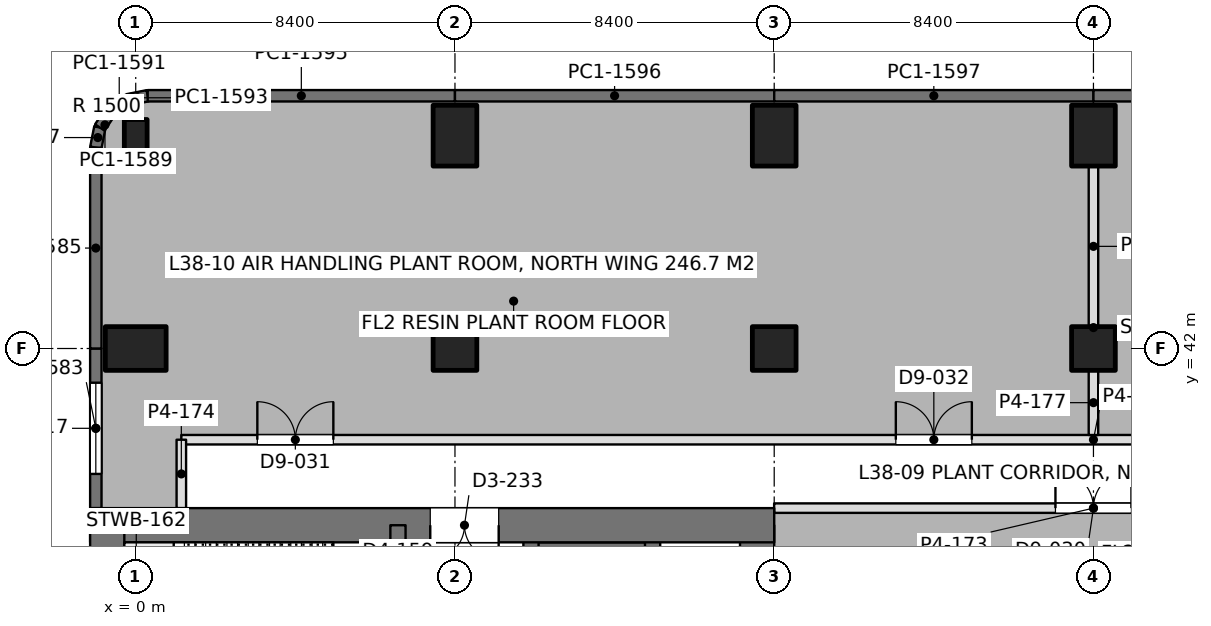
"""IFC4 building model, lengths in metres.
Left out: names, types, materials, properties, quantities, classifications, styles, units other than length and angle.
Written with IfcOpenShell. Run it as: python <this file> out.ifc"""

import sys

from ifc_helpers import new_model, si_unit, direction, frame, frame_2d, origin, origin_2d, place, context, subcontext, project, spatial, rectangle, extrude, element, fill, save


model = new_model("IFC4")
c1 = context("Model", 3, precision=1e-05, world=origin(), true_north=direction((0.0, 1.0)))
c2 = subcontext(c1, "Body", "Model", "MODEL_VIEW")
j1 = project(units=[si_unit("LENGTHUNIT", "METRE"), si_unit("PLANEANGLEUNIT", "RADIAN")], contexts=[c1])
p1 = place(None, origin())
s1 = spatial("IfcSite", under=j1, at=p1, CompositionType="ELEMENT")
p2 = place(p1, origin())
s2 = spatial("IfcBuilding", under=s1, at=p2, CompositionType="ELEMENT")
p3 = place(p2, frame((0.0, 0.0, 168.0)))
s3 = spatial("IfcBuildingStorey", under=s2, at=p3, CompositionType="ELEMENT", Elevation=168.0)
p4 = place(p3, frame((0.0, 42.0, 0.0), z_axis=(0.0, 0.0, 1.0), x_axis=(0.0, 1.0, 0.0)))
e1 = element("IfcColumn", 1, at=p4, inside=s3, PredefinedType="COLUMN", context=c2, shape_type="SweptSolid", body=[
    extrude(rectangle(XDim=1.15, YDim=1.6, at=origin_2d()), origin(), (0.0, 0.0, 1.0), 5.4),
])
p5 = place(p3, frame((0.0, 47.6, 0.0), z_axis=(0.0, 0.0, 1.0), x_axis=(1.0, 0.0, 0.0)))
e2 = element("IfcColumn", 2, at=p5, inside=s3, PredefinedType="COLUMN", context=c2, shape_type="SweptSolid", body=[
    extrude(rectangle(XDim=0.6, YDim=0.85, at=origin_2d()), origin(), (0.0, 0.0, 1.0), 5.24),
])
p6 = place(p3, frame((8.4, 42.0, 0.0), z_axis=(0.0, 0.0, 1.0), x_axis=(1.0, 0.0, 0.0)))
e3 = element("IfcColumn", 3, at=p6, inside=s3, PredefinedType="COLUMN", context=c2, shape_type="SweptSolid", body=[
    extrude(rectangle(XDim=1.15, YDim=1.15, at=origin_2d()), origin(), (0.0, 0.0, 1.0), 5.4),
])
p7 = place(p3, frame((8.4, 47.6, 0.0), z_axis=(0.0, 0.0, 1.0), x_axis=(1.0, 0.0, 0.0)))
e4 = element("IfcColumn", 4, at=p7, inside=s3, PredefinedType="COLUMN", context=c2, shape_type="SweptSolid", body=[
    extrude(rectangle(XDim=1.15, YDim=1.6, at=origin_2d()), origin(), (0.0, 0.0, 1.0), 5.24),
])
p8 = place(p3, frame((16.8, 42.0, 0.0), z_axis=(0.0, 0.0, 1.0), x_axis=(1.0, 0.0, 0.0)))
e5 = element("IfcColumn", 5, at=p8, inside=s3, PredefinedType="COLUMN", context=c2, shape_type="SweptSolid", body=[
    extrude(rectangle(XDim=1.15, YDim=1.15, at=origin_2d()), origin(), (0.0, 0.0, 1.0), 5.4),
])
p9 = place(p3, frame((16.8, 47.6, 0.0), z_axis=(0.0, 0.0, 1.0), x_axis=(1.0, 0.0, 0.0)))
e6 = element("IfcColumn", 6, at=p9, inside=s3, PredefinedType="COLUMN", context=c2, shape_type="SweptSolid", body=[
    extrude(rectangle(XDim=1.15, YDim=1.6, at=origin_2d()), origin(), (0.0, 0.0, 1.0), 5.24),
])
p10 = place(p3, frame((25.2, 42.0, 0.0), z_axis=(0.0, 0.0, 1.0), x_axis=(1.0, 0.0, 0.0)))
e7 = element("IfcColumn", 7, at=p10, inside=s3, PredefinedType="COLUMN", context=c2, shape_type="SweptSolid", body=[
    extrude(rectangle(XDim=1.15, YDim=1.15, at=origin_2d()), origin(), (0.0, 0.0, 1.0), 5.4),
])
p11 = place(p3, frame((25.2, 47.6, 0.0), z_axis=(0.0, 0.0, 1.0), x_axis=(1.0, 0.0, 0.0)))
e8 = element("IfcColumn", 8, at=p11, inside=s3, PredefinedType="COLUMN", context=c2, shape_type="SweptSolid", body=[
    extrude(rectangle(XDim=1.15, YDim=1.6, at=origin_2d()), origin(), (0.0, 0.0, 1.0), 5.24),
])
p12 = place(p3, frame((-1.2, 37.35, 0.0), z_axis=(0.0, 0.0, 1.0), x_axis=(1.0, 0.0, 0.0)))
e9 = element("IfcWall", 9, at=p12, inside=s3, PredefinedType="SHEAR", context=c2, shape_type="SweptSolid", body=[
    extrude(rectangle(XDim=18.0, YDim=0.9, at=frame_2d((9.0, 0.0))), origin(), (0.0, 0.0, 1.0), 5.4),
])
p13 = place(p12, frame((8.95, 0.0, 0.0)))
e10 = element("IfcOpeningElement", 10, at=p13, cuts=e9, PredefinedType="OPENING", context=c2, shape_type="SweptSolid", body=[
    extrude(rectangle(XDim=1.8, YDim=2.4, at=frame_2d((0.9, 1.2))), frame((0.0, 0.46, 0.0), z_axis=(0.0, -1.0, 0.0), x_axis=(1.0, 0.0, 0.0)), (0.0, 0.0, 1.0), 0.92),
])
p14 = place(p3, frame((-0.75, 13.05, 0.0), z_axis=(0.0, 0.0, 1.0), x_axis=(0.0, 1.0, 0.0)))
e11 = element("IfcWall", 11, at=p14, inside=s3, PredefinedType="SHEAR", context=c2, shape_type="SweptSolid", body=[
    extrude(rectangle(XDim=24.3, YDim=0.9, at=frame_2d((12.15, 0.0))), origin(), (0.0, 0.0, 1.0), 5.4),
])
p15 = place(p3, frame((16.35, 22.1, 0.0), z_axis=(0.0, 0.0, 1.0), x_axis=(0.0, 1.0, 0.0)))
e12 = element("IfcWall", 12, at=p15, inside=s3, PredefinedType="SHEAR", context=c2, shape_type="SweptSolid", body=[
    extrude(rectangle(XDim=15.25, YDim=0.9, at=frame_2d((7.625, 0.0))), origin(), (0.0, 0.0, 1.0), 5.4),
])
p16 = place(p3, frame((6.9, 13.05, 0.0), z_axis=(0.0, 0.0, 1.0), x_axis=(0.0, 1.0, 0.0)))
e13 = element("IfcWall", 13, at=p16, inside=s3, PredefinedType="SHEAR", context=c2, shape_type="SweptSolid", body=[
    extrude(rectangle(XDim=24.3, YDim=0.4, at=frame_2d((12.15, 0.0))), origin(), (0.0, 0.0, 1.0), 5.4),
])
p17 = place(p16, frame((1.3, 0.0, 0.0)))
e14 = element("IfcOpeningElement", 14, at=p17, cuts=e13, PredefinedType="OPENING", context=c2, shape_type="SweptSolid", body=[
    extrude(rectangle(XDim=1.0, YDim=2.2, at=frame_2d((0.5, 1.1))), frame((0.0, 0.21, 0.0), z_axis=(0.0, -1.0, 0.0), x_axis=(1.0, 0.0, 0.0)), (0.0, 0.0, 1.0), 0.42),
])
p18 = place(p16, frame((22.0, 0.0, 0.0)))
e15 = element("IfcOpeningElement", 15, at=p18, cuts=e13, PredefinedType="OPENING", context=c2, shape_type="SweptSolid", body=[
    extrude(rectangle(XDim=1.0, YDim=2.2, at=frame_2d((0.5, 1.1))), frame((0.0, 0.21, 0.0), z_axis=(0.0, -1.0, 0.0), x_axis=(1.0, 0.0, 0.0)), (0.0, 0.0, 1.0), 0.42),
])
p19 = place(p16, frame((5.55, 0.0, 0.0)))
e16 = element("IfcOpeningElement", 16, at=p19, cuts=e13, PredefinedType="OPENING", context=c2, shape_type="SweptSolid", body=[
    extrude(rectangle(XDim=1.0, YDim=2.2, at=frame_2d((0.5, 1.1))), frame((0.0, 0.21, 0.0), z_axis=(0.0, -1.0, 0.0), x_axis=(1.0, 0.0, 0.0)), (0.0, 0.0, 1.0), 0.42),
])
p20 = place(p16, frame((9.55, 0.0, 0.0)))
e17 = element("IfcOpeningElement", 17, at=p20, cuts=e13, PredefinedType="OPENING", context=c2, shape_type="SweptSolid", body=[
    extrude(rectangle(XDim=1.0, YDim=2.2, at=frame_2d((0.5, 1.1))), frame((0.0, 0.21, 0.0), z_axis=(0.0, -1.0, 0.0), x_axis=(1.0, 0.0, 0.0)), (0.0, 0.0, 1.0), 0.42),
])
p21 = place(p16, frame((12.8, 0.0, 0.0)))
e18 = element("IfcOpeningElement", 18, at=p21, cuts=e13, PredefinedType="OPENING", context=c2, shape_type="SweptSolid", body=[
    extrude(rectangle(XDim=1.1, YDim=2.2, at=frame_2d((0.55, 1.1))), frame((0.0, 0.21, 0.0), z_axis=(0.0, -1.0, 0.0), x_axis=(1.0, 0.0, 0.0)), (0.0, 0.0, 1.0), 0.42),
])
p22 = place(p16, frame((15.538, 0.0, 0.0)))
e19 = element("IfcOpeningElement", 19, at=p22, cuts=e13, PredefinedType="OPENING", context=c2, shape_type="SweptSolid", body=[
    extrude(rectangle(XDim=1.1, YDim=2.2, at=frame_2d((0.55, 1.1))), frame((0.0, 0.21, 0.0), z_axis=(0.0, -1.0, 0.0), x_axis=(1.0, 0.0, 0.0)), (0.0, 0.0, 1.0), 0.42),
])
p23 = place(p16, frame((18.262, 0.0, 0.0)))
e20 = element("IfcOpeningElement", 20, at=p23, cuts=e13, PredefinedType="OPENING", context=c2, shape_type="SweptSolid", body=[
    extrude(rectangle(XDim=1.1, YDim=2.2, at=frame_2d((0.55, 1.1))), frame((0.0, 0.21, 0.0), z_axis=(0.0, -1.0, 0.0), x_axis=(1.0, 0.0, 0.0)), (0.0, 0.0, 1.0), 0.42),
])
p24 = place(p3, frame((10.4, 13.05, 0.0), z_axis=(0.0, 0.0, 1.0), x_axis=(0.0, 1.0, 0.0)))
e21 = element("IfcWall", 21, at=p24, inside=s3, PredefinedType="SHEAR", context=c2, shape_type="SweptSolid", body=[
    extrude(rectangle(XDim=24.3, YDim=0.4, at=frame_2d((12.15, 0.0))), origin(), (0.0, 0.0, 1.0), 5.4),
])
p25 = place(p24, frame((10.05, 0.0, 0.0)))
e22 = element("IfcOpeningElement", 22, at=p25, cuts=e21, PredefinedType="OPENING", context=c2, shape_type="SweptSolid", body=[
    extrude(rectangle(XDim=1.1, YDim=2.2, at=frame_2d((0.55, 1.1))), frame((0.0, 0.21, 0.0), z_axis=(0.0, -1.0, 0.0), x_axis=(1.0, 0.0, 0.0)), (0.0, 0.0, 1.0), 0.42),
])
p26 = place(p24, frame((12.9, 0.0, 0.0)))
e23 = element("IfcOpeningElement", 23, at=p26, cuts=e21, PredefinedType="OPENING", context=c2, shape_type="SweptSolid", body=[
    extrude(rectangle(XDim=1.1, YDim=2.2, at=frame_2d((0.55, 1.1))), frame((0.0, 0.21, 0.0), z_axis=(0.0, -1.0, 0.0), x_axis=(1.0, 0.0, 0.0)), (0.0, 0.0, 1.0), 0.42),
])
p27 = place(p24, frame((21.45, 0.0, 0.0)))
e24 = element("IfcOpeningElement", 24, at=p27, cuts=e21, PredefinedType="OPENING", context=c2, shape_type="SweptSolid", body=[
    extrude(rectangle(XDim=1.1, YDim=2.2, at=frame_2d((0.55, 1.1))), frame((0.0, 0.21, 0.0), z_axis=(0.0, -1.0, 0.0), x_axis=(1.0, 0.0, 0.0)), (0.0, 0.0, 1.0), 0.42),
])
p28 = place(p24, frame((5.8, 0.0, 0.0)))
e25 = element("IfcOpeningElement", 25, at=p28, cuts=e21, PredefinedType="OPENING", context=c2, shape_type="SweptSolid", body=[
    extrude(rectangle(XDim=1.8, YDim=2.4, at=frame_2d((0.9, 1.2))), frame((0.0, 0.21, 0.0), z_axis=(0.0, -1.0, 0.0), x_axis=(1.0, 0.0, 0.0)), (0.0, 0.0, 1.0), 0.42),
])
p29 = place(p24, frame((1.05, 0.0, 0.0)))
e26 = element("IfcOpeningElement", 26, at=p29, cuts=e21, PredefinedType="OPENING", context=c2, shape_type="SweptSolid", body=[
    extrude(rectangle(XDim=1.8, YDim=2.4, at=frame_2d((0.9, 1.2))), frame((0.0, 0.21, 0.0), z_axis=(0.0, -1.0, 0.0), x_axis=(1.0, 0.0, 0.0)), (0.0, 0.0, 1.0), 0.42),
])
p30 = place(p3, frame((13.6, 22.225, 0.0), z_axis=(0.0, 0.0, 1.0), x_axis=(0.0, 1.0, 0.0)))
e27 = element("IfcWall", 27, at=p30, inside=s3, PredefinedType="SHEAR", context=c2, shape_type="SweptSolid", body=[
    extrude(rectangle(XDim=15.125, YDim=0.4, at=frame_2d((7.562, 0.0))), origin(), (0.0, 0.0, 1.0), 5.4),
])
p31 = place(p3, frame((10.4, 36.625, 0.0), z_axis=(0.0, 0.0, 1.0), x_axis=(1.0, 0.0, 0.0)))
e28 = element("IfcWall", 28, at=p31, inside=s3, PredefinedType="SHEAR", context=c2, shape_type="SweptSolid", body=[
    extrude(rectangle(XDim=3.2, YDim=0.55, at=frame_2d((1.6, 0.0))), origin(), (0.0, 0.0, 1.0), 5.4),
])
p32 = place(p3, frame((-1.05, 37.8, 0.0), z_axis=(0.0, 0.0, 1.0), x_axis=(0.0, 1.0, 0.0)))
e29 = element("IfcWall", 29, at=p32, inside=s3, PredefinedType="SOLIDWALL", context=c2, shape_type="SweptSolid", body=[
    extrude(rectangle(XDim=4.2, YDim=0.3, at=frame_2d((2.1, 0.0))), origin(), (0.0, 0.0, 1.0), 5.25),
])
p33 = place(p32, frame((0.9, 0.0, 1.2)))
e30 = element("IfcOpeningElement", 30, at=p33, cuts=e29, PredefinedType="OPENING", context=c2, shape_type="SweptSolid", body=[
    extrude(rectangle(XDim=2.4, YDim=2.4, at=frame_2d((1.2, 1.2))), frame((0.0, 0.16, 0.0), z_axis=(0.0, -1.0, 0.0), x_axis=(1.0, 0.0, 0.0)), (0.0, 0.0, 1.0), 0.32),
])
p34 = place(p3, frame((-1.05, 42.0, 0.0), z_axis=(0.0, 0.0, 1.0), x_axis=(0.0, 1.0, 0.0)))
e31 = element("IfcWall", 31, at=p34, inside=s3, PredefinedType="SOLIDWALL", context=c2, shape_type="SweptSolid", body=[
    extrude(rectangle(XDim=5.285, YDim=0.3, at=frame_2d((2.643, 0.0))), origin(), (0.0, 0.0, 1.0), 5.24),
])
p35 = place(p3, frame((-1.05, 47.285, 0.0), z_axis=(0.0, 0.0, 1.0), x_axis=(0.195073962632, 0.980788534345, 0.0)))
e32 = element("IfcWall", 32, at=p35, inside=s3, PredefinedType="SOLIDWALL", context=c2, shape_type="SweptSolid", body=[
    extrude(rectangle(XDim=0.541, YDim=0.3, at=frame_2d((0.271, 0.0))), origin(), (0.0, 0.0, 1.0), 5.04),
])
p36 = place(p3, frame((-0.945, 47.815, 0.0), z_axis=(0.0, 0.0, 1.0), x_axis=(0.55534295404, 0.831621430339, 0.0)))
e33 = element("IfcWall", 33, at=p36, inside=s3, PredefinedType="SOLIDWALL", context=c2, shape_type="SweptSolid", body=[
    extrude(rectangle(XDim=0.526, YDim=0.3, at=frame_2d((0.263, 0.0))), origin(), (0.0, 0.0, 1.0), 5.04),
])
p37 = place(p3, frame((-0.653, 48.253, 0.0), z_axis=(0.0, 0.0, 1.0), x_axis=(0.831692711774, 0.555236195849, 0.0)))
e34 = element("IfcWall", 34, at=p37, inside=s3, PredefinedType="SOLIDWALL", context=c2, shape_type="SweptSolid", body=[
    extrude(rectangle(XDim=0.525, YDim=0.3, at=frame_2d((0.263, 0.0))), origin(), (0.0, 0.0, 1.0), 5.04),
])
p38 = place(p3, frame((-0.216, 48.544, 0.0), z_axis=(0.0, 0.0, 1.0), x_axis=(0.980788534345, 0.195073962632, 0.0)))
e35 = element("IfcWall", 35, at=p38, inside=s3, PredefinedType="SOLIDWALL", context=c2, shape_type="SweptSolid", body=[
    extrude(rectangle(XDim=0.541, YDim=0.3, at=frame_2d((0.271, 0.0))), origin(), (0.0, 0.0, 1.0), 5.04),
])
p39 = place(p3, frame((0.315, 48.65, 0.0), z_axis=(0.0, 0.0, 1.0), x_axis=(1.0, 0.0, 0.0)))
e36 = element("IfcWall", 36, at=p39, inside=s3, PredefinedType="SOLIDWALL", context=c2, shape_type="SweptSolid", body=[
    extrude(rectangle(XDim=8.085, YDim=0.3, at=frame_2d((4.042, 0.0))), origin(), (0.0, 0.0, 1.0), 5.04),
])
p40 = place(p3, frame((8.4, 48.65, 0.0), z_axis=(0.0, 0.0, 1.0), x_axis=(1.0, 0.0, 0.0)))
e37 = element("IfcWall", 37, at=p40, inside=s3, PredefinedType="SOLIDWALL", context=c2, shape_type="SweptSolid", body=[
    extrude(rectangle(XDim=8.4, YDim=0.3, at=frame_2d((4.2, 0.0))), origin(), (0.0, 0.0, 1.0), 5.04),
])
p41 = place(p3, frame((16.8, 48.65, 0.0), z_axis=(0.0, 0.0, 1.0), x_axis=(1.0, 0.0, 0.0)))
e38 = element("IfcWall", 38, at=p41, inside=s3, PredefinedType="SOLIDWALL", context=c2, shape_type="SweptSolid", body=[
    extrude(rectangle(XDim=8.4, YDim=0.3, at=frame_2d((4.2, 0.0))), origin(), (0.0, 0.0, 1.0), 5.04),
])
p42 = place(p3, frame((25.2, 48.65, 0.0), z_axis=(0.0, 0.0, 1.0), x_axis=(1.0, 0.0, 0.0)))
e39 = element("IfcWall", 39, at=p42, inside=s3, PredefinedType="SOLIDWALL", context=c2, shape_type="SweptSolid", body=[
    extrude(rectangle(XDim=8.4, YDim=0.3, at=frame_2d((4.2, 0.0))), origin(), (0.0, 0.0, 1.0), 5.04),
])
p43 = place(p3, frame((1.2, 39.6, 0.0), z_axis=(0.0, 0.0, 1.0), x_axis=(1.0, 0.0, 0.0)))
e40 = element("IfcWall", 40, at=p43, inside=s3, PredefinedType="PARTITIONING", context=c2, shape_type="SweptSolid", body=[
    extrude(rectangle(XDim=48.0, YDim=0.25, at=frame_2d((24.0, 0.0))), origin(), (0.0, 0.0, 1.0), 4.725),
])
p44 = place(p43, frame((2.0, 0.0, 0.0)))
e41 = element("IfcOpeningElement", 41, at=p44, cuts=e40, PredefinedType="OPENING", context=c2, shape_type="SweptSolid", body=[
    extrude(rectangle(XDim=2.0, YDim=2.4, at=frame_2d((1.0, 1.2))), frame((0.0, 0.135, 0.0), z_axis=(0.0, -1.0, 0.0), x_axis=(1.0, 0.0, 0.0)), (0.0, 0.0, 1.0), 0.27),
])
p45 = place(p43, frame((18.8, 0.0, 0.0)))
e42 = element("IfcOpeningElement", 42, at=p45, cuts=e40, PredefinedType="OPENING", context=c2, shape_type="SweptSolid", body=[
    extrude(rectangle(XDim=2.0, YDim=2.4, at=frame_2d((1.0, 1.2))), frame((0.0, 0.135, 0.0), z_axis=(0.0, -1.0, 0.0), x_axis=(1.0, 0.0, 0.0)), (0.0, 0.0, 1.0), 0.27),
])
p46 = place(p43, frame((27.2, 0.0, 0.0)))
e43 = element("IfcOpeningElement", 43, at=p46, cuts=e40, PredefinedType="OPENING", context=c2, shape_type="SweptSolid", body=[
    extrude(rectangle(XDim=2.0, YDim=2.4, at=frame_2d((1.0, 1.2))), frame((0.0, 0.135, 0.0), z_axis=(0.0, -1.0, 0.0), x_axis=(1.0, 0.0, 0.0)), (0.0, 0.0, 1.0), 0.27),
])
p47 = place(p43, frame((44.0, 0.0, 0.0)))
e44 = element("IfcOpeningElement", 44, at=p47, cuts=e40, PredefinedType="OPENING", context=c2, shape_type="SweptSolid", body=[
    extrude(rectangle(XDim=2.0, YDim=2.4, at=frame_2d((1.0, 1.2))), frame((0.0, 0.135, 0.0), z_axis=(0.0, -1.0, 0.0), x_axis=(1.0, 0.0, 0.0)), (0.0, 0.0, 1.0), 0.27),
])
p48 = place(p3, frame((1.2, 37.8, 0.0), z_axis=(0.0, 0.0, 1.0), x_axis=(0.0, 1.0, 0.0)))
e45 = element("IfcWall", 45, at=p48, inside=s3, PredefinedType="PARTITIONING", context=c2, shape_type="SweptSolid", body=[
    extrude(rectangle(XDim=1.8, YDim=0.25, at=frame_2d((0.9, 0.0))), origin(), (0.0, 0.0, 1.0), 5.25),
])
p49 = place(p3, frame((25.2, 39.724, 0.0), z_axis=(0.0, 0.0, 1.0), x_axis=(0.0, 1.0, 0.0)))
e46 = element("IfcWall", 46, at=p49, inside=s3, PredefinedType="PARTITIONING", context=c2, shape_type="SweptSolid", body=[
    extrude(rectangle(XDim=1.702, YDim=0.25, at=frame_2d((0.851, 0.0))), origin(), (0.0, 0.0, 1.0), 4.75),
])
p50 = place(p3, frame((25.2, 42.574, 0.0), z_axis=(0.0, 0.0, 1.0), x_axis=(0.0, 1.0, 0.0)))
e47 = element("IfcWall", 47, at=p50, inside=s3, PredefinedType="PARTITIONING", context=c2, shape_type="SweptSolid", body=[
    extrude(rectangle(XDim=4.227, YDim=0.25, at=frame_2d((2.114, 0.0))), origin(), (0.0, 0.0, 1.0), 3.24),
])
p51 = place(p3, frame((16.798, 37.8, 0.0), z_axis=(0.0, 0.0, 1.0), x_axis=(1.0, 0.0, 0.0)))
e48 = element("IfcWall", 48, at=p51, inside=s3, PredefinedType="PARTITIONING", context=c2, shape_type="SweptSolid", body=[
    extrude(rectangle(XDim=16.804, YDim=0.25, at=frame_2d((8.402, 0.0))), origin(), (0.0, 0.0, 1.0), 4.725),
])
p52 = place(p51, frame((7.402, 0.0, 0.0)))
e49 = element("IfcOpeningElement", 49, at=p52, cuts=e48, PredefinedType="OPENING", context=c2, shape_type="SweptSolid", body=[
    extrude(rectangle(XDim=2.0, YDim=2.4, at=frame_2d((1.0, 1.2))), frame((0.0, 0.135, 0.0), z_axis=(0.0, -1.0, 0.0), x_axis=(1.0, 0.0, 0.0)), (0.0, 0.0, 1.0), 0.27),
])
p53 = place(p33, origin())
e50 = element("IfcWindow", 50, at=p53, inside=s3, PartitioningType="SINGLE_PANEL", PredefinedType="USERDEFINED", context=c2, shape_type="SweptSolid", body=[
    extrude(rectangle(XDim=2.4, YDim=2.4, at=frame_2d((1.2, 1.2))), frame((0.0, 0.03, 0.0), z_axis=(0.0, -1.0, 0.0), x_axis=(1.0, 0.0, 0.0)), (0.0, 0.0, 1.0), 0.06),
])
fill(e30, e50)
p54 = place(p13, frame((1.8, 0.0, 0.0), z_axis=(0.0, 0.0, 1.0), x_axis=(-1.0, 0.0, 0.0)))
e51 = element("IfcDoor", 51, at=p54, inside=s3, OperationType="DOUBLE_DOOR_SINGLE_SWING", PredefinedType="DOOR", context=c2, shape_type="SweptSolid", body=[
    extrude(rectangle(XDim=1.8, YDim=2.4, at=frame_2d((0.9, 1.2))), frame((0.0, 0.025, 0.0), z_axis=(0.0, -1.0, 0.0), x_axis=(1.0, 0.0, 0.0)), (0.0, 0.0, 1.0), 0.05),
])
fill(e10, e51)
p55 = place(p44, origin())
e52 = element("IfcDoor", 52, at=p55, inside=s3, OperationType="DOUBLE_DOOR_SINGLE_SWING", PredefinedType="DOOR", context=c2, shape_type="SweptSolid", body=[
    extrude(rectangle(XDim=2.0, YDim=2.4, at=frame_2d((1.0, 1.2))), frame((0.0, 0.025, 0.0), z_axis=(0.0, -1.0, 0.0), x_axis=(1.0, 0.0, 0.0)), (0.0, 0.0, 1.0), 0.05),
])
fill(e41, e52)
p56 = place(p45, origin())
e53 = element("IfcDoor", 53, at=p56, inside=s3, OperationType="DOUBLE_DOOR_SINGLE_SWING", PredefinedType="DOOR", context=c2, shape_type="SweptSolid", body=[
    extrude(rectangle(XDim=2.0, YDim=2.4, at=frame_2d((1.0, 1.2))), frame((0.0, 0.025, 0.0), z_axis=(0.0, -1.0, 0.0), x_axis=(1.0, 0.0, 0.0)), (0.0, 0.0, 1.0), 0.05),
])
fill(e42, e53)
p57 = place(p52, origin())
e54 = element("IfcDoor", 54, at=p57, inside=s3, OperationType="DOUBLE_DOOR_SINGLE_SWING", PredefinedType="DOOR", context=c2, shape_type="SweptSolid", body=[
    extrude(rectangle(XDim=2.0, YDim=2.4, at=frame_2d((1.0, 1.2))), frame((0.0, 0.025, 0.0), z_axis=(0.0, -1.0, 0.0), x_axis=(1.0, 0.0, 0.0)), (0.0, 0.0, 1.0), 0.05),
])
fill(e49, e54)
save(model, sys.argv[1])
